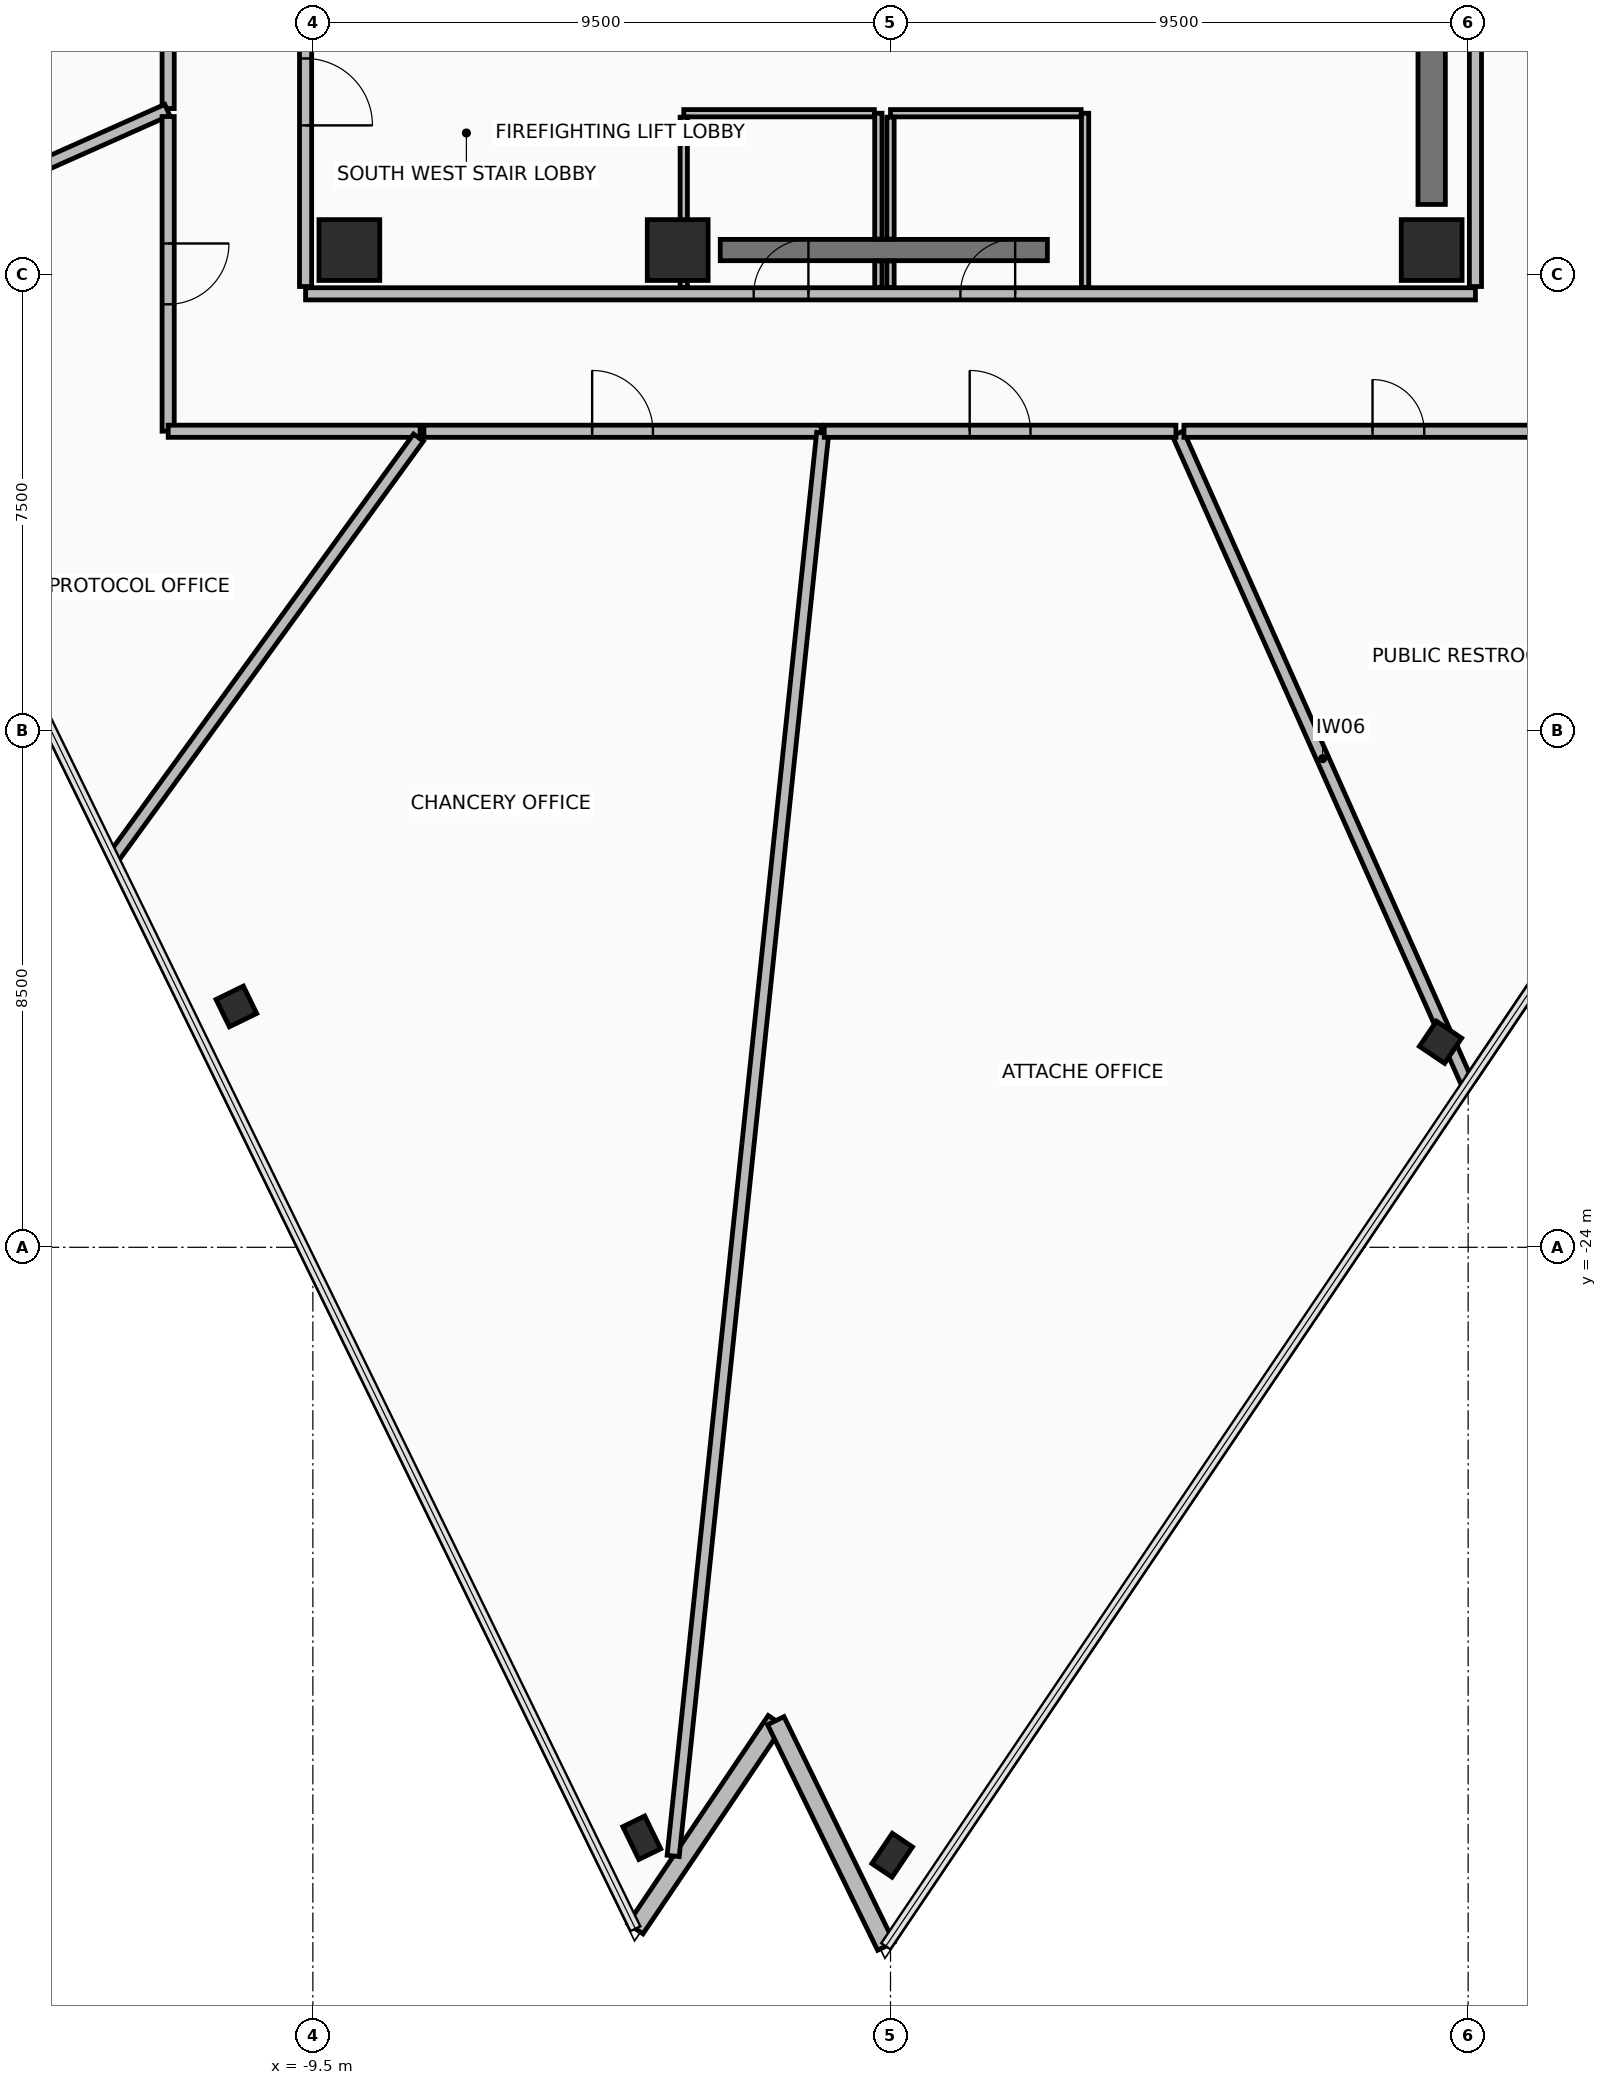
"""IFC4 building model, lengths in metres.
Left out: names, types, materials, properties, quantities, classifications, styles, units other than length and angle.
Written with IfcOpenShell. Run it as: python <this file> out.ifc"""

import sys

from ifc_helpers import new_model, si_unit, direction, frame, frame_2d, origin, origin_2d, place, context, subcontext, project, spatial, rectangle, hollow_rectangle, extrude, element, fill, save


model = new_model("IFC4")
c1 = context("Model", 3, precision=1e-05, world=origin(), true_north=direction((0.0, 1.0)))
c2 = subcontext(c1, "Body", "Model", "MODEL_VIEW")
j1 = project(units=[si_unit("LENGTHUNIT", "METRE"), si_unit("PLANEANGLEUNIT", "RADIAN")], contexts=[c1])
p1 = place(None, origin())
s1 = spatial("IfcSite", under=j1, at=p1, CompositionType="ELEMENT")
p2 = place(p1, origin())
s2 = spatial("IfcBuilding", under=s1, at=p2, CompositionType="ELEMENT")
p3 = place(p2, frame((0.0, 0.0, 227.05)))
s3 = spatial("IfcBuildingStorey", under=s2, at=p3, CompositionType="ELEMENT", Elevation=227.05)
for number, where, z_axis, x_axis in (
    (1, (-8.9, -7.6, 0.0), (0.0, 0.0, 1.0), (1.0, 0.0, 0.0)),
    (2, (-3.5, -7.6, 0.0), (0.0, 0.0, 1.0), (1.0, 0.0, 0.0)),
    (3, (8.9, -7.6, 0.0), (0.0, 0.0, 1.0), (1.0, 0.0, 0.0)),
):
    element("IfcColumn", number, at=place(p3, frame(where, z_axis=z_axis, x_axis=x_axis)), inside=s3, PredefinedType="COLUMN", context=c2, shape_type="SweptSolid", body=[
        extrude(rectangle(XDim=1.0, YDim=1.0, at=origin_2d()), origin(), (0.0, 0.0, 1.0), 3.6),
    ])
p4 = place(p3, frame((-10.758, -20.039, 0.0), z_axis=(0.0, 0.0, 1.0), x_axis=(-0.438371146789, 0.898794046299, 0.0)))
e4 = element("IfcColumn", 4, at=p4, inside=s3, PredefinedType="COLUMN", context=c2, shape_type="SweptSolid", body=[
    extrude(hollow_rectangle(XDim=0.5, YDim=0.5, WallThickness=0.032, at=origin_2d()), origin(), (0.0, 0.0, 1.0), 3.6),
])
for number, where, z_axis, x_axis in (
    (5, (-4.091, -33.71, 0.0), (0.0, 0.0, 1.0), (-0.438, 0.899, 0.0)),
    (6, (0.027, -33.998, 0.0), (0.0, 0.0, 1.0), (0.559, 0.829, 0.0)),
):
    element("IfcColumn", number, at=place(p3, frame(where, z_axis=z_axis, x_axis=x_axis)), inside=s3, PredefinedType="COLUMN", context=c2, shape_type="SweptSolid", body=[
        extrude(hollow_rectangle(XDim=0.4, YDim=0.6, WallThickness=0.03, at=origin_2d()), origin(), (0.0, 0.0, 1.0), 3.6),
    ])
p5 = place(p3, frame((9.046, -20.628, -0.19), z_axis=(0.0, 0.0, 1.0), x_axis=(0.559194350413, 0.829036596578, 0.0)))
e7 = element("IfcColumn", 7, at=p5, inside=s3, PredefinedType="COLUMN", context=c2, shape_type="SweptSolid", body=[
    extrude(hollow_rectangle(XDim=0.5, YDim=0.5, WallThickness=0.032, at=origin_2d()), origin(), (0.0, 0.0, 1.0), 3.79),
])
p6 = place(p3, frame((-4.195, -35.207, 0.0), z_axis=(0.0, 0.0, 1.0), x_axis=(0.559182319101, 0.829044711704, 0.0)))
e8 = element("IfcWall", 8, at=p6, inside=s3, PredefinedType="STANDARD", context=c2, shape_type="SweptSolid", body=[
    extrude(rectangle(XDim=4.128, YDim=0.3, at=frame_2d((2.064, 0.0))), origin(), (0.0, 0.0, 1.0), 2.765),
])
p7 = place(p3, frame((-1.887, -31.784, 0.0), z_axis=(0.0, 0.0, 1.0), x_axis=(0.438367699713, -0.898795727542, 0.0)))
e9 = element("IfcWall", 9, at=p7, inside=s3, PredefinedType="STANDARD", context=c2, shape_type="SweptSolid", body=[
    extrude(rectangle(XDim=4.128, YDim=0.3, at=frame_2d((2.064, 0.0))), origin(), (0.0, 0.0, 1.0), 2.765),
])
p8 = place(p3, frame((-2.8, -7.6, 0.0), z_axis=(0.0, 0.0, 1.0), x_axis=(1.0, 0.0, 0.0)))
e10 = element("IfcWall", 10, at=p8, inside=s3, PredefinedType="SHEAR", context=c2, shape_type="SweptSolid", body=[
    extrude(rectangle(XDim=5.38, YDim=0.35, at=frame_2d((2.69, 0.0))), origin(), (0.0, 0.0, 1.0), 3.42),
])
p9 = place(p3, frame((8.9, -6.85, 0.0), z_axis=(0.0, 0.0, 1.0), x_axis=(0.0, 1.0, 0.0)))
e11 = element("IfcWall", 11, at=p9, inside=s3, PredefinedType="SHEAR", context=c2, shape_type="SweptSolid", body=[
    extrude(rectangle(XDim=10.7, YDim=0.45, at=frame_2d((5.35, 0.0))), origin(), (0.0, 0.0, 1.0), 3.42),
])
p10 = place(p3, frame((-9.62, -8.32, 0.0), z_axis=(0.0, 0.0, 1.0), x_axis=(1.0, 0.0, 0.0)))
e12 = element("IfcWall", 12, at=p10, inside=s3, PredefinedType="PARTITIONING", context=c2, shape_type="SweptSolid", body=[
    extrude(rectangle(XDim=19.24, YDim=0.2, at=frame_2d((9.62, 0.0))), origin(), (0.0, 0.0, 1.0), 2.915),
])
p11 = place(p10, frame((7.37, 0.0, 0.0)))
e13 = element("IfcOpeningElement", 13, at=p11, cuts=e12, PredefinedType="OPENING", context=c2, shape_type="SweptSolid", body=[
    extrude(rectangle(XDim=0.9, YDim=2.1, at=frame_2d((0.45, 1.05))), frame((0.0, 0.11, 0.0), z_axis=(0.0, -1.0, 0.0), x_axis=(1.0, 0.0, 0.0)), (0.0, 0.0, 1.0), 0.22),
])
p12 = place(p10, frame((10.77, 0.0, 0.0)))
e14 = element("IfcOpeningElement", 14, at=p12, cuts=e12, PredefinedType="OPENING", context=c2, shape_type="SweptSolid", body=[
    extrude(rectangle(XDim=0.9, YDim=2.1, at=frame_2d((0.45, 1.05))), frame((0.0, 0.11, 0.0), z_axis=(0.0, -1.0, 0.0), x_axis=(1.0, 0.0, 0.0)), (0.0, 0.0, 1.0), 0.22),
])
p13 = place(p3, frame((-9.62, 8.2, 0.0), z_axis=(0.0, 0.0, 1.0), x_axis=(0.0, -1.0, 0.0)))
e15 = element("IfcWall", 15, at=p13, inside=s3, PredefinedType="PARTITIONING", context=c2, shape_type="SweptSolid", body=[
    extrude(rectangle(XDim=16.4, YDim=0.2, at=frame_2d((8.2, 0.0))), origin(), (0.0, 0.0, 1.0), 2.765),
])
p14 = place(p13, frame((12.65, 0.0, 0.0)))
e16 = element("IfcOpeningElement", 16, at=p14, cuts=e15, PredefinedType="OPENING", context=c2, shape_type="SweptSolid", body=[
    extrude(rectangle(XDim=1.1, YDim=2.15, at=frame_2d((0.55, 1.075))), frame((0.0, 0.11, 0.0), z_axis=(0.0, -1.0, 0.0), x_axis=(1.0, 0.0, 0.0)), (0.0, 0.0, 1.0), 0.22),
])
p15 = place(p3, frame((9.62, -8.2, 0.0), z_axis=(0.0, 0.0, 1.0), x_axis=(0.0, 1.0, 0.0)))
e17 = element("IfcWall", 17, at=p15, inside=s3, PredefinedType="PARTITIONING", context=c2, shape_type="SweptSolid", body=[
    extrude(rectangle(XDim=16.4, YDim=0.2, at=frame_2d((8.2, 0.0))), origin(), (0.0, 0.0, 1.0), 2.915),
])
p16 = place(p15, frame((12.65, 0.0, 0.0)))
e18 = element("IfcOpeningElement", 18, at=p16, cuts=e17, PredefinedType="OPENING", context=c2, shape_type="SweptSolid", body=[
    extrude(rectangle(XDim=1.1, YDim=2.15, at=frame_2d((0.55, 1.075))), frame((0.0, 0.11, 0.0), z_axis=(0.0, -1.0, 0.0), x_axis=(1.0, 0.0, 0.0)), (0.0, 0.0, 1.0), 0.22),
])
p17 = place(p3, frame((-0.2, -8.215, 0.0), z_axis=(0.0, 0.0, 1.0), x_axis=(0.0, 1.0, 0.0)))
e19 = element("IfcWall", 19, at=p17, inside=s3, PredefinedType="PARTITIONING", context=c2, shape_type="SweptSolid", body=[
    extrude(rectangle(XDim=0.435, YDim=0.12, at=frame_2d((0.218, 0.0))), origin(), (0.0, 0.0, 1.0), 2.715),
])
p18 = place(p3, frame((-0.2, -7.42, 0.0), z_axis=(0.0, 0.0, 1.0), x_axis=(0.0, 1.0, 0.0)))
e20 = element("IfcWall", 20, at=p18, inside=s3, PredefinedType="PARTITIONING", context=c2, shape_type="SweptSolid", body=[
    extrude(rectangle(XDim=2.07, YDim=0.12, at=frame_2d((1.035, 0.0))), origin(), (0.0, 0.0, 1.0), 2.715),
])
p19 = place(p3, frame((-0.265, -5.35, 0.0), z_axis=(0.0, 0.0, 1.0), x_axis=(-1.0, 0.0, 0.0)))
e21 = element("IfcWall", 21, at=p19, inside=s3, PredefinedType="PARTITIONING", context=c2, shape_type="SweptSolid", body=[
    extrude(rectangle(XDim=3.135, YDim=0.12, at=frame_2d((1.567, 0.0))), origin(), (0.0, 0.0, 1.0), 2.715),
])
p20 = place(p3, frame((-3.4, -5.415, 0.0), z_axis=(0.0, 0.0, 1.0), x_axis=(0.0, -1.0, 0.0)))
e22 = element("IfcWall", 22, at=p20, inside=s3, PredefinedType="PARTITIONING", context=c2, shape_type="SweptSolid", body=[
    extrude(rectangle(XDim=2.8, YDim=0.12, at=frame_2d((1.4, 0.0))), origin(), (0.0, 0.0, 1.0), 2.715),
])
p21 = place(p3, frame((3.2, -8.215, 0.0), z_axis=(0.0, 0.0, 1.0), x_axis=(0.0, 1.0, 0.0)))
e23 = element("IfcWall", 23, at=p21, inside=s3, PredefinedType="PARTITIONING", context=c2, shape_type="SweptSolid", body=[
    extrude(rectangle(XDim=2.865, YDim=0.12, at=frame_2d((1.433, 0.0))), origin(), (0.0, 0.0, 1.0), 2.715),
])
p22 = place(p3, frame((3.135, -5.35, 0.0), z_axis=(0.0, 0.0, 1.0), x_axis=(-1.0, 0.0, 0.0)))
e24 = element("IfcWall", 24, at=p22, inside=s3, PredefinedType="PARTITIONING", context=c2, shape_type="SweptSolid", body=[
    extrude(rectangle(XDim=3.135, YDim=0.12, at=frame_2d((1.567, 0.0))), origin(), (0.0, 0.0, 1.0), 3.42),
])
p23 = place(p3, frame((0.0, -5.415, 0.0), z_axis=(0.0, 0.0, 1.0), x_axis=(0.0, -1.0, 0.0)))
e25 = element("IfcWall", 25, at=p23, inside=s3, PredefinedType="PARTITIONING", context=c2, shape_type="SweptSolid", body=[
    extrude(rectangle(XDim=2.005, YDim=0.12, at=frame_2d((1.002, 0.0))), origin(), (0.0, 0.0, 1.0), 2.715),
])
p24 = place(p3, frame((0.0, -7.78, 0.0), z_axis=(0.0, 0.0, 1.0), x_axis=(0.0, -1.0, 0.0)))
e26 = element("IfcWall", 26, at=p24, inside=s3, PredefinedType="PARTITIONING", context=c2, shape_type="SweptSolid", body=[
    extrude(rectangle(XDim=0.435, YDim=0.12, at=frame_2d((0.218, 0.0))), origin(), (0.0, 0.0, 1.0), 2.715),
])
p25 = place(p3, frame((9.489, -21.312, 0.0), z_axis=(0.0, 0.0, 1.0), x_axis=(-0.406732299424, 0.913547391549, 0.0)))
e27 = element("IfcWall", 27, at=p25, inside=s3, PredefinedType="PARTITIONING", context=c2, shape_type="SweptSolid", body=[
    extrude(rectangle(XDim=11.709, YDim=0.2, at=frame_2d((5.854, 0.0))), origin(), (0.0, 0.0, 1.0), 2.765),
])
p26 = place(p3, frame((4.825, -10.58, 0.0), z_axis=(0.0, 0.0, 1.0), x_axis=(1.0, 0.0, 0.0)))
e28 = element("IfcWall", 28, at=p26, inside=s3, PredefinedType="PARTITIONING", context=c2, shape_type="SweptSolid", body=[
    extrude(rectangle(XDim=7.054, YDim=0.2, at=frame_2d((3.527, 0.0))), origin(), (0.0, 0.0, 1.0), 2.915),
])
p27 = place(p26, frame((3.102, 0.0, 0.0)))
e29 = element("IfcOpeningElement", 29, at=p27, cuts=e28, PredefinedType="OPENING", context=c2, shape_type="SweptSolid", body=[
    extrude(rectangle(XDim=0.85, YDim=2.1, at=frame_2d((0.425, 1.05))), frame((0.0, 0.11, 0.0), z_axis=(0.0, -1.0, 0.0), x_axis=(1.0, 0.0, 0.0)), (0.0, 0.0, 1.0), 0.22),
])
p28 = place(p3, frame((16.002, -11.656, 0.0), z_axis=(0.0, 0.0, 1.0), x_axis=(-0.559190096432, -0.82903946592, 0.0)))
e30 = element("IfcWall", 30, at=p28, inside=s3, PredefinedType="PARTITIONING", context=c2, shape_type="SweptSolid", body=[
    extrude(rectangle(XDim=11.523, YDim=0.15, at=frame_2d((5.762, 0.0))), origin(), (0.0, 0.0, 1.0), 3.42),
])
p29 = place(p3, frame((-11.88, 1.226, 0.0), z_axis=(0.0, 0.0, 1.0), x_axis=(0.0, -1.0, 0.0)))
e31 = element("IfcWall", 31, at=p29, inside=s3, PredefinedType="PARTITIONING", context=c2, shape_type="SweptSolid", body=[
    extrude(rectangle(XDim=6.499, YDim=0.2, at=frame_2d((3.25, 0.0))), origin(), (0.0, 0.0, 1.0), 3.42),
])
p30 = place(p29, frame((2.75, 0.0, 0.0)))
e32 = element("IfcOpeningElement", 32, at=p30, cuts=e31, PredefinedType="OPENING", context=c2, shape_type="SweptSolid", body=[
    extrude(rectangle(XDim=1.0, YDim=2.15, at=frame_2d((0.5, 1.075))), frame((0.0, 0.11, 0.0), z_axis=(0.0, -1.0, 0.0), x_axis=(1.0, 0.0, 0.0)), (0.0, 0.0, 1.0), 0.22),
])
p31 = place(p3, frame((-11.895, -5.296, 0.0), z_axis=(0.0, 0.0, 1.0), x_axis=(-0.913548703363, -0.406729352991, 0.0)))
e33 = element("IfcWall", 33, at=p31, inside=s3, PredefinedType="PARTITIONING", context=c2, shape_type="SweptSolid", body=[
    extrude(rectangle(XDim=6.171, YDim=0.2, at=frame_2d((3.085, 0.0))), origin(), (0.0, 0.0, 1.0), 2.765),
])
p32 = place(p3, frame((-11.88, -5.404, 0.0), z_axis=(0.0, 0.0, 1.0), x_axis=(0.0, -1.0, 0.0)))
e34 = element("IfcWall", 34, at=p32, inside=s3, PredefinedType="PARTITIONING", context=c2, shape_type="SweptSolid", body=[
    extrude(rectangle(XDim=5.175, YDim=0.2, at=frame_2d((2.587, 0.0))), origin(), (0.0, 0.0, 1.0), 2.915),
])
p33 = place(p32, frame((2.088, 0.0, 0.0)))
e35 = element("IfcOpeningElement", 35, at=p33, cuts=e34, PredefinedType="OPENING", context=c2, shape_type="SweptSolid", body=[
    extrude(rectangle(XDim=1.0, YDim=2.15, at=frame_2d((0.5, 1.075))), frame((0.0, 0.11, 0.0), z_axis=(0.0, -1.0, 0.0), x_axis=(1.0, 0.0, 0.0)), (0.0, 0.0, 1.0), 0.22),
])
p34 = place(p3, frame((-11.879, -10.58, 0.0), z_axis=(0.0, 0.0, 1.0), x_axis=(1.0, 0.0, 0.0)))
e36 = element("IfcWall", 36, at=p34, inside=s3, PredefinedType="PARTITIONING", context=c2, shape_type="SweptSolid", body=[
    extrude(rectangle(XDim=4.144, YDim=0.2, at=frame_2d((2.072, 0.0))), origin(), (0.0, 0.0, 1.0), 2.915),
])
p35 = place(p3, frame((-7.763, -10.685, 0.0), z_axis=(0.0, 0.0, 1.0), x_axis=(-0.587785890463, -0.809016530716, 0.0)))
e37 = element("IfcWall", 37, at=p35, inside=s3, PredefinedType="PARTITIONING", context=c2, shape_type="SweptSolid", body=[
    extrude(rectangle(XDim=8.543, YDim=0.2, at=frame_2d((4.271, 0.0))), origin(), (0.0, 0.0, 1.0), 2.765),
])
p36 = place(p3, frame((-7.674, -10.58, 0.0), z_axis=(0.0, 0.0, 1.0), x_axis=(1.0, 0.0, 0.0)))
e38 = element("IfcWall", 38, at=p36, inside=s3, PredefinedType="PARTITIONING", context=c2, shape_type="SweptSolid", body=[
    extrude(rectangle(XDim=6.534, YDim=0.2, at=frame_2d((3.267, 0.0))), origin(), (0.0, 0.0, 1.0), 2.915),
])
p37 = place(p36, frame((2.767, 0.0, 0.0)))
e39 = element("IfcOpeningElement", 39, at=p37, cuts=e38, PredefinedType="OPENING", context=c2, shape_type="SweptSolid", body=[
    extrude(rectangle(XDim=1.0, YDim=2.15, at=frame_2d((0.5, 1.075))), frame((0.0, 0.11, 0.0), z_axis=(0.0, -1.0, 0.0), x_axis=(1.0, 0.0, 0.0)), (0.0, 0.0, 1.0), 0.22),
])
p38 = place(p3, frame((-1.115, -10.608, 0.0), z_axis=(0.0, 0.0, 1.0), x_axis=(-0.104524911937, -0.994522268622, 0.0)))
e40 = element("IfcWall", 40, at=p38, inside=s3, PredefinedType="PARTITIONING", context=c2, shape_type="SweptSolid", body=[
    extrude(rectangle(XDim=23.53, YDim=0.2, at=frame_2d((11.765, 0.0))), origin(), (0.0, 0.0, 1.0), 2.765),
])
p39 = place(p3, frame((-1.09, -10.58, 0.0), z_axis=(0.0, 0.0, 1.0), x_axis=(1.0, 0.0, 0.0)))
e41 = element("IfcWall", 41, at=p39, inside=s3, PredefinedType="PARTITIONING", context=c2, shape_type="SweptSolid", body=[
    extrude(rectangle(XDim=5.784, YDim=0.2, at=frame_2d((2.892, 0.0))), origin(), (0.0, 0.0, 1.0), 3.42),
])
p40 = place(p39, frame((2.392, 0.0, 0.0)))
e42 = element("IfcOpeningElement", 42, at=p40, cuts=e41, PredefinedType="OPENING", context=c2, shape_type="SweptSolid", body=[
    extrude(rectangle(XDim=1.0, YDim=2.15, at=frame_2d((0.5, 1.075))), frame((0.0, 0.11, 0.0), z_axis=(0.0, -1.0, 0.0), x_axis=(1.0, 0.0, 0.0)), (0.0, 0.0, 1.0), 0.22),
])
p41 = place(p14, frame((1.1, 0.0, 0.0), z_axis=(0.0, 0.0, 1.0), x_axis=(-1.0, 0.0, 0.0)))
e43 = element("IfcDoor", 43, at=p41, inside=s3, OperationType="SINGLE_SWING_LEFT", PredefinedType="DOOR", context=c2, shape_type="SweptSolid", body=[
    extrude(rectangle(XDim=1.1, YDim=2.15, at=frame_2d((0.55, 1.075))), frame((0.0, 0.025, 0.0), z_axis=(0.0, -1.0, 0.0), x_axis=(1.0, 0.0, 0.0)), (0.0, 0.0, 1.0), 0.05),
])
fill(e16, e43)
p42 = place(p11, frame((0.9, 0.0, 0.0), z_axis=(0.0, 0.0, 1.0), x_axis=(-1.0, 0.0, 0.0)))
e44 = element("IfcDoor", 44, at=p42, inside=s3, OperationType="SINGLE_SWING_LEFT", PredefinedType="DOOR", context=c2, shape_type="SweptSolid", body=[
    extrude(rectangle(XDim=0.9, YDim=2.1, at=frame_2d((0.45, 1.05))), frame((0.0, 0.025, 0.0), z_axis=(0.0, -1.0, 0.0), x_axis=(1.0, 0.0, 0.0)), (0.0, 0.0, 1.0), 0.05),
])
fill(e13, e44)
p43 = place(p12, frame((0.9, 0.0, 0.0), z_axis=(0.0, 0.0, 1.0), x_axis=(-1.0, 0.0, 0.0)))
e45 = element("IfcDoor", 45, at=p43, inside=s3, OperationType="SINGLE_SWING_LEFT", PredefinedType="DOOR", context=c2, shape_type="SweptSolid", body=[
    extrude(rectangle(XDim=0.9, YDim=2.1, at=frame_2d((0.45, 1.05))), frame((0.0, 0.025, 0.0), z_axis=(0.0, -1.0, 0.0), x_axis=(1.0, 0.0, 0.0)), (0.0, 0.0, 1.0), 0.05),
])
fill(e14, e45)
p44 = place(p27, origin())
e46 = element("IfcDoor", 46, at=p44, inside=s3, OperationType="SINGLE_SWING_RIGHT", PredefinedType="DOOR", context=c2, shape_type="SweptSolid", body=[
    extrude(rectangle(XDim=0.85, YDim=2.1, at=frame_2d((0.425, 1.05))), frame((0.0, 0.025, 0.0), z_axis=(0.0, -1.0, 0.0), x_axis=(1.0, 0.0, 0.0)), (0.0, 0.0, 1.0), 0.05),
])
fill(e29, e46)
p45 = place(p33, origin())
e47 = element("IfcDoor", 47, at=p45, inside=s3, OperationType="SINGLE_SWING_RIGHT", PredefinedType="DOOR", context=c2, shape_type="SweptSolid", body=[
    extrude(rectangle(XDim=1.0, YDim=2.15, at=frame_2d((0.5, 1.075))), frame((0.0, 0.025, 0.0), z_axis=(0.0, -1.0, 0.0), x_axis=(1.0, 0.0, 0.0)), (0.0, 0.0, 1.0), 0.05),
])
fill(e35, e47)
p46 = place(p37, origin())
e48 = element("IfcDoor", 48, at=p46, inside=s3, OperationType="SINGLE_SWING_RIGHT", PredefinedType="DOOR", context=c2, shape_type="SweptSolid", body=[
    extrude(rectangle(XDim=1.0, YDim=2.15, at=frame_2d((0.5, 1.075))), frame((0.0, 0.025, 0.0), z_axis=(0.0, -1.0, 0.0), x_axis=(1.0, 0.0, 0.0)), (0.0, 0.0, 1.0), 0.05),
])
fill(e39, e48)
p47 = place(p40, origin())
e49 = element("IfcDoor", 49, at=p47, inside=s3, OperationType="SINGLE_SWING_RIGHT", PredefinedType="DOOR", context=c2, shape_type="SweptSolid", body=[
    extrude(rectangle(XDim=1.0, YDim=2.15, at=frame_2d((0.5, 1.075))), frame((0.0, 0.025, 0.0), z_axis=(0.0, -1.0, 0.0), x_axis=(1.0, 0.0, 0.0)), (0.0, 0.0, 1.0), 0.05),
])
fill(e42, e49)
save(model, sys.argv[1])
